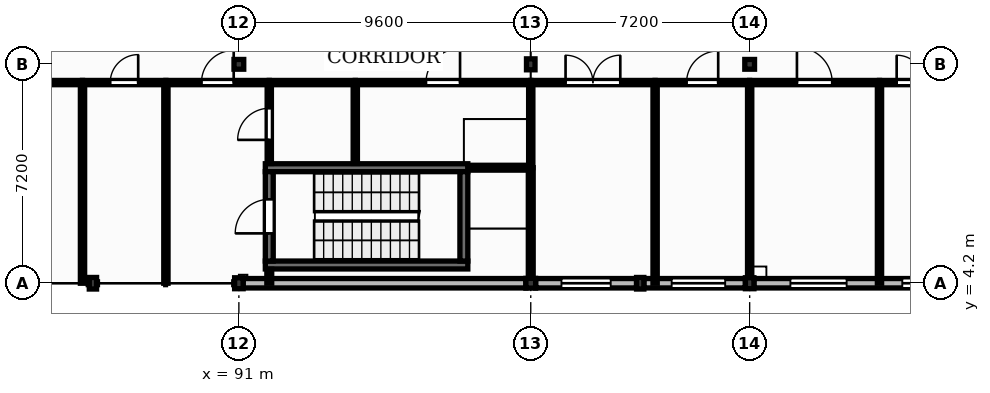
"""IFC4 building model, lengths in metres.
Left out: names, types, materials, properties, quantities, classifications, styles, units other than length and angle.
Written with IfcOpenShell. Run it as: python <this file> out.ifc"""

import sys

from ifc_helpers import new_model, si_unit, direction, frame, frame_2d, origin, origin_2d, place, context, subcontext, project, spatial, rectangle, extrude, element, fill, save


model = new_model("IFC4")
c1 = context("Model", 3, precision=1e-05, world=origin(), true_north=direction((0.0, 1.0)))
c2 = subcontext(c1, "Body", "Model", "MODEL_VIEW")
j1 = project(units=[si_unit("LENGTHUNIT", "METRE"), si_unit("PLANEANGLEUNIT", "RADIAN")], contexts=[c1])
p1 = place(None, origin())
s1 = spatial("IfcSite", under=j1, at=p1, CompositionType="ELEMENT")
p2 = place(p1, origin())
s2 = spatial("IfcBuilding", under=s1, at=p2, CompositionType="ELEMENT")
p3 = place(p2, frame((0.0, 0.0, 9.0)))
s3 = spatial("IfcBuildingStorey", under=s2, at=p3, CompositionType="ELEMENT", Elevation=9.0)
p4 = place(p3, frame((91.0, 4.2, 0.0), z_axis=(0.0, 0.0, 1.0), x_axis=(1.0, 0.0, 0.0)))
e1 = element("IfcColumn", 1, at=p4, inside=s3, PredefinedType="COLUMN", context=c2, shape_type="SweptSolid", body=[
    extrude(rectangle(XDim=0.28, YDim=0.36, at=origin_2d()), origin(), (0.0, 0.0, 1.0), 3.99),
])
for number, where, z_axis, x_axis in (
    (2, (91.0, 11.4, 0.0), (0.0, 0.0, 1.0), (1.0, 0.0, 0.0)),
    (3, (100.6, 4.2, 0.0), (0.0, 0.0, 1.0), (1.0, 0.0, 0.0)),
):
    element("IfcColumn", number, at=place(p3, frame(where, z_axis=z_axis, x_axis=x_axis)), inside=s3, PredefinedType="COLUMN", context=c2, shape_type="SweptSolid", body=[
        extrude(rectangle(XDim=0.32, YDim=0.32, at=origin_2d()), origin(), (0.0, 0.0, 1.0), 3.99),
    ])
p5 = place(p3, frame((100.6, 11.4, 0.0), z_axis=(0.0, 0.0, 1.0), x_axis=(1.0, 0.0, 0.0)))
e4 = element("IfcColumn", 4, at=p5, inside=s3, PredefinedType="COLUMN", context=c2, shape_type="SweptSolid", body=[
    extrude(rectangle(XDim=0.28, YDim=0.36, at=origin_2d()), origin(), (0.0, 0.0, 1.0), 3.99),
])
p6 = place(p3, frame((107.8, 4.2, 0.0), z_axis=(0.0, 0.0, 1.0), x_axis=(1.0, 0.0, 0.0)))
e5 = element("IfcColumn", 5, at=p6, inside=s3, PredefinedType="COLUMN", context=c2, shape_type="SweptSolid", body=[
    extrude(rectangle(XDim=0.28, YDim=0.36, at=origin_2d()), origin(), (0.0, 0.0, 1.0), 3.98),
])
p7 = place(p3, frame((107.8, 11.4, 0.0), z_axis=(0.0, 0.0, 1.0), x_axis=(1.0, 0.0, 0.0)))
e6 = element("IfcColumn", 6, at=p7, inside=s3, PredefinedType="COLUMN", context=c2, shape_type="SweptSolid", body=[
    extrude(rectangle(XDim=0.32, YDim=0.32, at=origin_2d()), origin(), (0.0, 0.0, 1.0), 3.98),
])
for number, where, z_axis, x_axis in (
    (7, (86.2, 4.2, 0.0), (0.0, 0.0, 1.0), (1.0, 0.0, 0.0)),
    (8, (104.2, 4.2, 0.0), (0.0, 0.0, 1.0), (1.0, 0.0, 0.0)),
):
    element("IfcColumn", number, at=place(p3, frame(where, z_axis=z_axis, x_axis=x_axis)), inside=s3, PredefinedType="PILASTER", context=c2, shape_type="SweptSolid", body=[
        extrude(rectangle(XDim=0.24, YDim=0.38, at=origin_2d()), origin(), (0.0, 0.0, 1.0), 3.99),
    ])
p8 = place(p3, frame((91.14, 4.2, 0.0), z_axis=(0.0, 0.0, 1.0), x_axis=(1.0, 0.0, 0.0)))
e9 = element("IfcWall", 9, at=p8, inside=s3, PredefinedType="SOLIDWALL", context=c2, shape_type="SweptSolid", body=[
    extrude(rectangle(XDim=9.3, YDim=0.31, at=frame_2d((4.65, 0.0))), origin(), (0.0, 0.0, 1.0), 3.53),
])
p9 = place(p3, frame((100.76, 4.2, 0.0), z_axis=(0.0, 0.0, 1.0), x_axis=(1.0, 0.0, 0.0)))
e10 = element("IfcWall", 10, at=p9, inside=s3, PredefinedType="SOLIDWALL", context=c2, shape_type="SweptSolid", body=[
    extrude(rectangle(XDim=3.32, YDim=0.31, at=frame_2d((1.66, 0.0))), origin(), (0.0, 0.0, 1.0), 3.52),
])
p10 = place(p9, frame((0.85, 0.0, 1.0)))
e11 = element("IfcOpeningElement", 11, at=p10, cuts=e10, PredefinedType="OPENING", context=c2, shape_type="SweptSolid", body=[
    extrude(rectangle(XDim=1.62, YDim=1.95, at=frame_2d((0.81, 0.975))), frame((0.0, 0.165, 0.0), z_axis=(0.0, -1.0, 0.0), x_axis=(1.0, 0.0, 0.0)), (0.0, 0.0, 1.0), 0.33),
])
p11 = place(p3, frame((104.32, 4.2, 0.0), z_axis=(0.0, 0.0, 1.0), x_axis=(1.0, 0.0, 0.0)))
e12 = element("IfcWall", 12, at=p11, inside=s3, PredefinedType="SOLIDWALL", context=c2, shape_type="SweptSolid", body=[
    extrude(rectangle(XDim=3.34, YDim=0.31, at=frame_2d((1.67, 0.0))), origin(), (0.0, 0.0, 1.0), 3.52),
])
p12 = place(p11, frame((0.915, 0.0, 1.0)))
e13 = element("IfcOpeningElement", 13, at=p12, cuts=e12, PredefinedType="OPENING", context=c2, shape_type="SweptSolid", body=[
    extrude(rectangle(XDim=1.76, YDim=1.95, at=frame_2d((0.88, 0.975))), frame((0.0, 0.165, 0.0), z_axis=(0.0, -1.0, 0.0), x_axis=(1.0, 0.0, 0.0)), (0.0, 0.0, 1.0), 0.33),
])
p13 = place(p3, frame((107.94, 4.2, 0.0), z_axis=(0.0, 0.0, 1.0), x_axis=(1.0, 0.0, 0.0)))
e14 = element("IfcWall", 14, at=p13, inside=s3, PredefinedType="SOLIDWALL", context=c2, shape_type="SweptSolid", body=[
    extrude(rectangle(XDim=6.9, YDim=0.31, at=frame_2d((3.45, 0.0))), origin(), (0.0, 0.0, 1.0), 3.52),
])
p14 = place(p13, frame((1.2, 0.0, 1.5)))
e15 = element("IfcOpeningElement", 15, at=p14, cuts=e14, PredefinedType="OPENING", context=c2, shape_type="SweptSolid", body=[
    extrude(rectangle(XDim=1.85, YDim=1.25, at=frame_2d((0.925, 0.625))), frame((0.0, 0.165, 0.0), z_axis=(0.0, -1.0, 0.0), x_axis=(1.0, 0.0, 0.0)), (0.0, 0.0, 1.0), 0.33),
])
p15 = place(p13, frame((4.88, 0.0, 1.5)))
e16 = element("IfcOpeningElement", 16, at=p15, cuts=e14, PredefinedType="OPENING", context=c2, shape_type="SweptSolid", body=[
    extrude(rectangle(XDim=1.15, YDim=1.25, at=frame_2d((0.575, 0.625))), frame((0.0, 0.165, 0.0), z_axis=(0.0, -1.0, 0.0), x_axis=(1.0, 0.0, 0.0)), (0.0, 0.0, 1.0), 0.33),
])
for number, where, z_axis, x_axis in (
    (17, (91.87, 4.8, 0.0), (0.0, 0.0, 1.0), (1.0, 0.0, 0.0)),
    (18, (91.87, 8.0, 0.0), (0.0, 0.0, 1.0), (1.0, 0.0, 0.0)),
):
    element("IfcWall", number, at=place(p3, frame(where, z_axis=z_axis, x_axis=x_axis)), inside=s3, PredefinedType="SHEAR", context=c2, shape_type="SweptSolid", body=[
        extrude(rectangle(XDim=6.66, YDim=0.26, at=frame_2d((3.33, 0.0))), origin(), (0.0, 0.0, 1.0), 3.95),
    ])
p16 = place(p3, frame((92.0, 4.93, 0.0), z_axis=(0.0, 0.0, 1.0), x_axis=(0.0, 1.0, 0.0)))
e19 = element("IfcWall", 19, at=p16, inside=s3, PredefinedType="SHEAR", context=c2, shape_type="SweptSolid", body=[
    extrude(rectangle(XDim=2.94, YDim=0.26, at=frame_2d((1.47, 0.0))), origin(), (0.0, 0.0, 1.0), 3.95),
])
p17 = place(p16, frame((0.91, 0.0, 0.0)))
e20 = element("IfcOpeningElement", 20, at=p17, cuts=e19, PredefinedType="OPENING", context=c2, shape_type="SweptSolid", body=[
    extrude(rectangle(XDim=1.12, YDim=2.1, at=frame_2d((0.56, 1.05))), frame((0.0, 0.14, 0.0), z_axis=(0.0, -1.0, 0.0), x_axis=(1.0, 0.0, 0.0)), (0.0, 0.0, 1.0), 0.28),
])
p18 = place(p3, frame((98.4, 4.93, 0.0), z_axis=(0.0, 0.0, 1.0), x_axis=(0.0, 1.0, 0.0)))
e21 = element("IfcWall", 21, at=p18, inside=s3, PredefinedType="SHEAR", context=c2, shape_type="SweptSolid", body=[
    extrude(rectangle(XDim=2.94, YDim=0.26, at=frame_2d((1.47, 0.0))), origin(), (0.0, 0.0, 1.0), 3.95),
])
p19 = place(p3, frame((81.4, 10.8, 0.0), z_axis=(0.0, 0.0, 1.0), x_axis=(1.0, 0.0, 0.0)))
e22 = element("IfcWall", 22, at=p19, inside=s3, PredefinedType="PARTITIONING", context=c2, shape_type="SweptSolid", body=[
    extrude(rectangle(XDim=4.457, YDim=0.14, at=frame_2d((2.229, 0.0))), origin(), (0.0, 0.0, 1.0), 3.96),
])
p20 = place(p19, frame((1.668, 0.0, 0.0)))
e23 = element("IfcOpeningElement", 23, at=p20, cuts=e22, PredefinedType="OPENING", context=c2, shape_type="SweptSolid", body=[
    extrude(rectangle(XDim=1.12, YDim=2.15, at=frame_2d((0.56, 1.075))), frame((0.0, 0.08, 0.0), z_axis=(0.0, -1.0, 0.0), x_axis=(1.0, 0.0, 0.0)), (0.0, 0.0, 1.0), 0.16),
])
p21 = place(p3, frame((85.857, 4.2, 0.0), z_axis=(0.0, 0.0, 1.0), x_axis=(0.0, 1.0, 0.0)))
e24 = element("IfcWall", 24, at=p21, inside=s3, PredefinedType="PARTITIONING", context=c2, shape_type="SweptSolid", body=[
    extrude(rectangle(XDim=6.53, YDim=0.14, at=frame_2d((3.265, 0.0))), origin(), (0.0, 0.0, 1.0), 3.96),
])
p22 = place(p3, frame((85.857, 10.8, 0.0), z_axis=(0.0, 0.0, 1.0), x_axis=(1.0, 0.0, 0.0)))
e25 = element("IfcWall", 25, at=p22, inside=s3, PredefinedType="PARTITIONING", context=c2, shape_type="SweptSolid", body=[
    extrude(rectangle(XDim=2.743, YDim=0.14, at=frame_2d((1.372, 0.0))), origin(), (0.0, 0.0, 1.0), 3.96),
])
p23 = place(p22, frame((0.912, 0.0, 0.0)))
e26 = element("IfcOpeningElement", 26, at=p23, cuts=e25, PredefinedType="OPENING", context=c2, shape_type="SweptSolid", body=[
    extrude(rectangle(XDim=0.92, YDim=2.1, at=frame_2d((0.46, 1.05))), frame((0.0, 0.08, 0.0), z_axis=(0.0, -1.0, 0.0), x_axis=(1.0, 0.0, 0.0)), (0.0, 0.0, 1.0), 0.16),
])
p24 = place(p3, frame((88.6, 4.2, 0.0), z_axis=(0.0, 0.0, 1.0), x_axis=(0.0, 1.0, 0.0)))
e27 = element("IfcWall", 27, at=p24, inside=s3, PredefinedType="PARTITIONING", context=c2, shape_type="SweptSolid", body=[
    extrude(rectangle(XDim=6.53, YDim=0.14, at=frame_2d((3.265, 0.0))), origin(), (0.0, 0.0, 1.0), 3.63),
])
p25 = place(p3, frame((88.6, 10.8, 0.0), z_axis=(0.0, 0.0, 1.0), x_axis=(1.0, 0.0, 0.0)))
e28 = element("IfcWall", 28, at=p25, inside=s3, PredefinedType="PARTITIONING", context=c2, shape_type="SweptSolid", body=[
    extrude(rectangle(XDim=3.4, YDim=0.14, at=frame_2d((1.7, 0.0))), origin(), (0.0, 0.0, 1.0), 3.96),
])
p26 = place(p25, frame((1.17, 0.0, 0.0)))
e29 = element("IfcOpeningElement", 29, at=p26, cuts=e28, PredefinedType="OPENING", context=c2, shape_type="SweptSolid", body=[
    extrude(rectangle(XDim=1.06, YDim=2.15, at=frame_2d((0.53, 1.075))), frame((0.0, 0.08, 0.0), z_axis=(0.0, -1.0, 0.0), x_axis=(1.0, 0.0, 0.0)), (0.0, 0.0, 1.0), 0.16),
])
p27 = place(p3, frame((92.0, 8.14, 0.0), z_axis=(0.0, 0.0, 1.0), x_axis=(0.0, 1.0, 0.0)))
e30 = element("IfcWall", 30, at=p27, inside=s3, PredefinedType="PARTITIONING", context=c2, shape_type="SweptSolid", body=[
    extrude(rectangle(XDim=2.59, YDim=0.14, at=frame_2d((1.295, 0.0))), origin(), (0.0, 0.0, 1.0), 3.96),
])
p28 = place(p27, frame((0.775, 0.0, 0.0)))
e31 = element("IfcOpeningElement", 31, at=p28, cuts=e30, PredefinedType="OPENING", context=c2, shape_type="SweptSolid", body=[
    extrude(rectangle(XDim=1.04, YDim=2.1, at=frame_2d((0.52, 1.05))), frame((0.0, 0.08, 0.0), z_axis=(0.0, -1.0, 0.0), x_axis=(1.0, 0.0, 0.0)), (0.0, 0.0, 1.0), 0.16),
])
p29 = place(p3, frame((92.0, 10.8, 0.0), z_axis=(0.0, 0.0, 1.0), x_axis=(1.0, 0.0, 0.0)))
e32 = element("IfcWall", 32, at=p29, inside=s3, PredefinedType="PARTITIONING", context=c2, shape_type="SweptSolid", body=[
    extrude(rectangle(XDim=2.829, YDim=0.14, at=frame_2d((1.415, 0.0))), origin(), (0.0, 0.0, 1.0), 3.96),
])
p30 = place(p3, frame((94.829, 8.14, 0.0), z_axis=(0.0, 0.0, 1.0), x_axis=(0.0, 1.0, 0.0)))
e33 = element("IfcWall", 33, at=p30, inside=s3, PredefinedType="PARTITIONING", context=c2, shape_type="SweptSolid", body=[
    extrude(rectangle(XDim=2.59, YDim=0.14, at=frame_2d((1.295, 0.0))), origin(), (0.0, 0.0, 1.0), 3.96),
])
p31 = place(p3, frame((94.829, 10.8, 0.0), z_axis=(0.0, 0.0, 1.0), x_axis=(1.0, 0.0, 0.0)))
e34 = element("IfcWall", 34, at=p31, inside=s3, PredefinedType="PARTITIONING", context=c2, shape_type="SweptSolid", body=[
    extrude(rectangle(XDim=5.771, YDim=0.14, at=frame_2d((2.885, 0.0))), origin(), (0.0, 0.0, 1.0), 3.96),
])
p32 = place(p31, frame((2.325, 0.0, 0.0)))
e35 = element("IfcOpeningElement", 35, at=p32, cuts=e34, PredefinedType="OPENING", context=c2, shape_type="SweptSolid", body=[
    extrude(rectangle(XDim=1.12, YDim=2.15, at=frame_2d((0.56, 1.075))), frame((0.0, 0.08, 0.0), z_axis=(0.0, -1.0, 0.0), x_axis=(1.0, 0.0, 0.0)), (0.0, 0.0, 1.0), 0.16),
])
p33 = place(p3, frame((100.6, 8.0, 0.0), z_axis=(0.0, 0.0, 1.0), x_axis=(0.0, 1.0, 0.0)))
e36 = element("IfcWall", 36, at=p33, inside=s3, PredefinedType="PARTITIONING", context=c2, shape_type="SweptSolid", body=[
    extrude(rectangle(XDim=2.73, YDim=0.14, at=frame_2d((1.365, 0.0))), origin(), (0.0, 0.0, 1.0), 3.47),
])
p34 = place(p3, frame((100.6, 10.8, 0.0), z_axis=(0.0, 0.0, 1.0), x_axis=(1.0, 0.0, 0.0)))
e37 = element("IfcWall", 37, at=p34, inside=s3, PredefinedType="PARTITIONING", context=c2, shape_type="SweptSolid", body=[
    extrude(rectangle(XDim=4.09, YDim=0.14, at=frame_2d((2.045, 0.0))), origin(), (0.0, 0.0, 1.0), 3.96),
])
p35 = place(p34, frame((1.145, 0.0, 0.0)))
e38 = element("IfcOpeningElement", 38, at=p35, cuts=e37, PredefinedType="OPENING", context=c2, shape_type="SweptSolid", body=[
    extrude(rectangle(XDim=1.8, YDim=2.3, at=frame_2d((0.9, 1.15))), frame((0.0, 0.08, 0.0), z_axis=(0.0, -1.0, 0.0), x_axis=(1.0, 0.0, 0.0)), (0.0, 0.0, 1.0), 0.16),
])
p36 = place(p3, frame((104.69, 4.2, 0.0), z_axis=(0.0, 0.0, 1.0), x_axis=(0.0, 1.0, 0.0)))
e39 = element("IfcWall", 39, at=p36, inside=s3, PredefinedType="PARTITIONING", context=c2, shape_type="SweptSolid", body=[
    extrude(rectangle(XDim=6.53, YDim=0.14, at=frame_2d((3.265, 0.0))), origin(), (0.0, 0.0, 1.0), 3.96),
])
p37 = place(p3, frame((104.69, 10.8, 0.0), z_axis=(0.0, 0.0, 1.0), x_axis=(1.0, 0.0, 0.0)))
e40 = element("IfcWall", 40, at=p37, inside=s3, PredefinedType="PARTITIONING", context=c2, shape_type="SweptSolid", body=[
    extrude(rectangle(XDim=3.11, YDim=0.14, at=frame_2d((1.555, 0.0))), origin(), (0.0, 0.0, 1.0), 3.96),
])
p38 = place(p37, frame((1.035, 0.0, 0.0)))
e41 = element("IfcOpeningElement", 41, at=p38, cuts=e40, PredefinedType="OPENING", context=c2, shape_type="SweptSolid", body=[
    extrude(rectangle(XDim=1.04, YDim=2.1, at=frame_2d((0.52, 1.05))), frame((0.0, 0.08, 0.0), z_axis=(0.0, -1.0, 0.0), x_axis=(1.0, 0.0, 0.0)), (0.0, 0.0, 1.0), 0.16),
])
p39 = place(p3, frame((107.8, 4.38, 0.0), z_axis=(0.0, 0.0, 1.0), x_axis=(0.0, 1.0, 0.0)))
e42 = element("IfcWall", 42, at=p39, inside=s3, PredefinedType="PARTITIONING", context=c2, shape_type="SweptSolid", body=[
    extrude(rectangle(XDim=6.35, YDim=0.14, at=frame_2d((3.175, 0.0))), origin(), (0.0, 0.0, 1.0), 3.52),
])
p40 = place(p3, frame((107.8, 10.8, 0.0), z_axis=(0.0, 0.0, 1.0), x_axis=(1.0, 0.0, 0.0)))
e43 = element("IfcWall", 43, at=p40, inside=s3, PredefinedType="PARTITIONING", context=c2, shape_type="SweptSolid", body=[
    extrude(rectangle(XDim=4.27, YDim=0.14, at=frame_2d((2.135, 0.0))), origin(), (0.0, 0.0, 1.0), 3.96),
])
p41 = place(p40, frame((1.555, 0.0, 0.0)))
e44 = element("IfcOpeningElement", 44, at=p41, cuts=e43, PredefinedType="OPENING", context=c2, shape_type="SweptSolid", body=[
    extrude(rectangle(XDim=1.16, YDim=2.1, at=frame_2d((0.58, 1.05))), frame((0.0, 0.08, 0.0), z_axis=(0.0, -1.0, 0.0), x_axis=(1.0, 0.0, 0.0)), (0.0, 0.0, 1.0), 0.16),
])
p42 = place(p3, frame((112.07, 4.2, 0.0), z_axis=(0.0, 0.0, 1.0), x_axis=(0.0, 1.0, 0.0)))
e45 = element("IfcWall", 45, at=p42, inside=s3, PredefinedType="PARTITIONING", context=c2, shape_type="SweptSolid", body=[
    extrude(rectangle(XDim=6.53, YDim=0.14, at=frame_2d((3.265, 0.0))), origin(), (0.0, 0.0, 1.0), 3.96),
])
p43 = place(p3, frame((112.07, 10.8, 0.0), z_axis=(0.0, 0.0, 1.0), x_axis=(1.0, 0.0, 0.0)))
e46 = element("IfcWall", 46, at=p43, inside=s3, PredefinedType="PARTITIONING", context=c2, shape_type="SweptSolid", body=[
    extrude(rectangle(XDim=2.93, YDim=0.14, at=frame_2d((1.465, 0.0))), origin(), (0.0, 0.0, 1.0), 3.96),
])
p44 = place(p43, frame((0.565, 0.0, 0.0)))
e47 = element("IfcOpeningElement", 47, at=p44, cuts=e46, PredefinedType="OPENING", context=c2, shape_type="SweptSolid", body=[
    extrude(rectangle(XDim=1.8, YDim=2.3, at=frame_2d((0.9, 1.15))), frame((0.0, 0.08, 0.0), z_axis=(0.0, -1.0, 0.0), x_axis=(1.0, 0.0, 0.0)), (0.0, 0.0, 1.0), 0.16),
])
p45 = place(p3, frame((92.0, 4.2, 0.0), z_axis=(0.0, 0.0, 1.0), x_axis=(0.0, 1.0, 0.0)))
e48 = element("IfcWall", 48, at=p45, inside=s3, PredefinedType="PARTITIONING", context=c2, shape_type="SweptSolid", body=[
    extrude(rectangle(XDim=0.46, YDim=0.16, at=frame_2d((0.23, 0.0))), origin(), (0.0, 0.0, 1.0), 3.96),
])
p46 = place(p3, frame((98.54, 8.0, 0.0), z_axis=(0.0, 0.0, 1.0), x_axis=(1.0, 0.0, 0.0)))
e49 = element("IfcWall", 49, at=p46, inside=s3, PredefinedType="PARTITIONING", context=c2, shape_type="SweptSolid", body=[
    extrude(rectangle(XDim=2.06, YDim=0.16, at=frame_2d((1.03, 0.0))), origin(), (0.0, 0.0, 1.0), 3.96),
])
p47 = place(p3, frame((100.6, 4.36, 0.0), z_axis=(0.0, 0.0, 1.0), x_axis=(0.0, 1.0, 0.0)))
e50 = element("IfcWall", 50, at=p47, inside=s3, PredefinedType="PARTITIONING", context=c2, shape_type="SweptSolid", body=[
    extrude(rectangle(XDim=3.64, YDim=0.16, at=frame_2d((1.82, 0.0))), origin(), (0.0, 0.0, 1.0), 3.47),
])
p48 = place(p10, origin())
e51 = element("IfcWindow", 51, at=p48, inside=s3, PartitioningType="DOUBLE_PANEL_VERTICAL", PredefinedType="WINDOW", context=c2, shape_type="SweptSolid", body=[
    extrude(rectangle(XDim=1.62, YDim=1.95, at=frame_2d((0.81, 0.975))), frame((0.0, 0.03, 0.0), z_axis=(0.0, -1.0, 0.0), x_axis=(1.0, 0.0, 0.0)), (0.0, 0.0, 1.0), 0.06),
])
fill(e11, e51)
p49 = place(p12, origin())
e52 = element("IfcWindow", 52, at=p49, inside=s3, PartitioningType="DOUBLE_PANEL_VERTICAL", PredefinedType="WINDOW", context=c2, shape_type="SweptSolid", body=[
    extrude(rectangle(XDim=1.76, YDim=1.95, at=frame_2d((0.88, 0.975))), frame((0.0, 0.03, 0.0), z_axis=(0.0, -1.0, 0.0), x_axis=(1.0, 0.0, 0.0)), (0.0, 0.0, 1.0), 0.06),
])
fill(e13, e52)
p50 = place(p14, origin())
e53 = element("IfcWindow", 53, at=p50, inside=s3, PartitioningType="DOUBLE_PANEL_VERTICAL", PredefinedType="WINDOW", context=c2, shape_type="SweptSolid", body=[
    extrude(rectangle(XDim=1.85, YDim=1.25, at=frame_2d((0.925, 0.625))), frame((0.0, 0.03, 0.0), z_axis=(0.0, -1.0, 0.0), x_axis=(1.0, 0.0, 0.0)), (0.0, 0.0, 1.0), 0.06),
])
fill(e15, e53)
p51 = place(p15, origin())
e54 = element("IfcWindow", 54, at=p51, inside=s3, PartitioningType="SINGLE_PANEL", PredefinedType="WINDOW", context=c2, shape_type="SweptSolid", body=[
    extrude(rectangle(XDim=1.15, YDim=1.25, at=frame_2d((0.575, 0.625))), frame((0.0, 0.03, 0.0), z_axis=(0.0, -1.0, 0.0), x_axis=(1.0, 0.0, 0.0)), (0.0, 0.0, 1.0), 0.06),
])
fill(e16, e54)
p52 = place(p17, origin())
e55 = element("IfcDoor", 55, at=p52, inside=s3, OperationType="SINGLE_SWING_LEFT", PredefinedType="DOOR", context=c2, shape_type="SweptSolid", body=[
    extrude(rectangle(XDim=1.12, YDim=2.1, at=frame_2d((0.56, 1.05))), frame((0.0, 0.025, 0.0), z_axis=(0.0, -1.0, 0.0), x_axis=(1.0, 0.0, 0.0)), (0.0, 0.0, 1.0), 0.05),
])
fill(e20, e55)
p53 = place(p26, origin())
e56 = element("IfcDoor", 56, at=p53, inside=s3, OperationType="SINGLE_SWING_RIGHT", PredefinedType="DOOR", context=c2, shape_type="SweptSolid", body=[
    extrude(rectangle(XDim=1.06, YDim=2.15, at=frame_2d((0.53, 1.075))), frame((0.0, 0.025, 0.0), z_axis=(0.0, -1.0, 0.0), x_axis=(1.0, 0.0, 0.0)), (0.0, 0.0, 1.0), 0.05),
])
fill(e29, e56)
p54 = place(p23, origin())
e57 = element("IfcDoor", 57, at=p54, inside=s3, OperationType="SINGLE_SWING_RIGHT", PredefinedType="DOOR", context=c2, shape_type="SweptSolid", body=[
    extrude(rectangle(XDim=0.92, YDim=2.1, at=frame_2d((0.46, 1.05))), frame((0.0, 0.025, 0.0), z_axis=(0.0, -1.0, 0.0), x_axis=(1.0, 0.0, 0.0)), (0.0, 0.0, 1.0), 0.05),
])
fill(e26, e57)
p55 = place(p28, origin())
e58 = element("IfcDoor", 58, at=p55, inside=s3, OperationType="SINGLE_SWING_LEFT", PredefinedType="DOOR", context=c2, shape_type="SweptSolid", body=[
    extrude(rectangle(XDim=1.04, YDim=2.1, at=frame_2d((0.52, 1.05))), frame((0.0, 0.025, 0.0), z_axis=(0.0, -1.0, 0.0), x_axis=(1.0, 0.0, 0.0)), (0.0, 0.0, 1.0), 0.05),
])
fill(e31, e58)
p56 = place(p32, origin())
e59 = element("IfcDoor", 59, at=p56, inside=s3, OperationType="SINGLE_SWING_RIGHT", PredefinedType="DOOR", context=c2, shape_type="SweptSolid", body=[
    extrude(rectangle(XDim=1.12, YDim=2.15, at=frame_2d((0.56, 1.075))), frame((0.0, 0.025, 0.0), z_axis=(0.0, -1.0, 0.0), x_axis=(1.0, 0.0, 0.0)), (0.0, 0.0, 1.0), 0.05),
])
fill(e35, e59)
p57 = place(p35, origin())
e60 = element("IfcDoor", 60, at=p57, inside=s3, OperationType="DOUBLE_DOOR_SINGLE_SWING", PredefinedType="DOOR", context=c2, shape_type="SweptSolid", body=[
    extrude(rectangle(XDim=1.8, YDim=2.3, at=frame_2d((0.9, 1.15))), frame((0.0, 0.025, 0.0), z_axis=(0.0, -1.0, 0.0), x_axis=(1.0, 0.0, 0.0)), (0.0, 0.0, 1.0), 0.05),
])
fill(e38, e60)
p58 = place(p38, origin())
e61 = element("IfcDoor", 61, at=p58, inside=s3, OperationType="SINGLE_SWING_RIGHT", PredefinedType="DOOR", context=c2, shape_type="SweptSolid", body=[
    extrude(rectangle(XDim=1.04, YDim=2.1, at=frame_2d((0.52, 1.05))), frame((0.0, 0.025, 0.0), z_axis=(0.0, -1.0, 0.0), x_axis=(1.0, 0.0, 0.0)), (0.0, 0.0, 1.0), 0.05),
])
fill(e41, e61)
p59 = place(p41, origin())
e62 = element("IfcDoor", 62, at=p59, inside=s3, OperationType="SINGLE_SWING_LEFT", PredefinedType="DOOR", context=c2, shape_type="SweptSolid", body=[
    extrude(rectangle(XDim=1.16, YDim=2.1, at=frame_2d((0.58, 1.05))), frame((0.0, 0.025, 0.0), z_axis=(0.0, -1.0, 0.0), x_axis=(1.0, 0.0, 0.0)), (0.0, 0.0, 1.0), 0.05),
])
fill(e44, e62)
p60 = place(p44, origin())
e63 = element("IfcDoor", 63, at=p60, inside=s3, OperationType="DOUBLE_DOOR_SINGLE_SWING", PredefinedType="DOOR", context=c2, shape_type="SweptSolid", body=[
    extrude(rectangle(XDim=1.8, YDim=2.3, at=frame_2d((0.9, 1.15))), frame((0.0, 0.025, 0.0), z_axis=(0.0, -1.0, 0.0), x_axis=(1.0, 0.0, 0.0)), (0.0, 0.0, 1.0), 0.05),
])
fill(e47, e63)
save(model, sys.argv[1])
